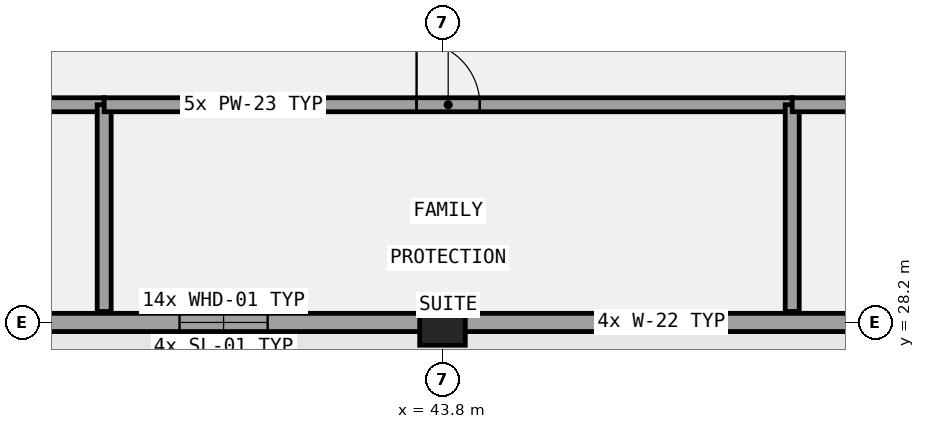
"""IFC4 building model, lengths in metres.
Left out: names, types, materials, properties, quantities, classifications, styles, units other than length and angle.
Written with IfcOpenShell. Run it as: python <this file> out.ifc"""

import sys

from ifc_helpers import new_model, si_unit, direction, frame, frame_2d, origin, origin_2d, place, context, subcontext, project, spatial, rectangle, extrude, element, fill, save


model = new_model("IFC4")
c1 = context("Model", 3, precision=1e-05, world=origin(), true_north=direction((0.0, 1.0)))
c2 = subcontext(c1, "Body", "Model", "MODEL_VIEW")
j1 = project(units=[si_unit("LENGTHUNIT", "METRE"), si_unit("PLANEANGLEUNIT", "RADIAN")], contexts=[c1])
p1 = place(None, origin())
s1 = spatial("IfcSite", under=j1, at=p1, CompositionType="ELEMENT")
p2 = place(p1, origin())
s2 = spatial("IfcBuilding", under=s1, at=p2, CompositionType="ELEMENT")
p3 = place(p2, frame((0.0, 0.0, 5.4)))
s3 = spatial("IfcBuildingStorey", under=s2, at=p3, CompositionType="ELEMENT", Elevation=5.4)
p4 = place(p3, frame((43.8, 28.2, 0.0), z_axis=(0.0, 0.0, 1.0), x_axis=(1.0, 0.0, 0.0)))
e1 = element("IfcColumn", 1, at=p4, inside=s3, PredefinedType="COLUMN", context=c2, shape_type="SweptSolid", body=[
    extrude(rectangle(XDim=0.75, YDim=0.75, at=origin_2d()), origin(), (0.0, 0.0, 1.0), 4.2),
])
p5 = place(p3, frame((29.25, 28.2, 0.0), z_axis=(0.0, 0.0, 1.0), x_axis=(1.0, 0.0, 0.0)))
e2 = element("IfcWall", 2, at=p5, inside=s3, PredefinedType="SOLIDWALL", context=c2, shape_type="SweptSolid", body=[
    extrude(rectangle(XDim=50.3, YDim=0.3, at=frame_2d((25.15, 0.0))), origin(), (0.0, 0.0, 1.0), 2.92),
])
p6 = place(p5, frame((3.025, 0.0, 1.0)))
e3 = element("IfcOpeningElement", 3, at=p6, cuts=e2, PredefinedType="OPENING", context=c2, shape_type="SweptSolid", body=[
    extrude(rectangle(XDim=1.45, YDim=1.65, at=frame_2d((0.725, 0.825))), frame((0.0, 0.16, 0.0), z_axis=(0.0, -1.0, 0.0), x_axis=(1.0, 0.0, 0.0)), (0.0, 0.0, 1.0), 0.32),
])
p7 = place(p5, frame((10.225, 0.0, 1.0)))
e4 = element("IfcOpeningElement", 4, at=p7, cuts=e2, PredefinedType="OPENING", context=c2, shape_type="SweptSolid", body=[
    extrude(rectangle(XDim=1.45, YDim=1.65, at=frame_2d((0.725, 0.825))), frame((0.0, 0.16, 0.0), z_axis=(0.0, -1.0, 0.0), x_axis=(1.0, 0.0, 0.0)), (0.0, 0.0, 1.0), 0.32),
])
p8 = place(p5, frame((17.425, 0.0, 1.0)))
e5 = element("IfcOpeningElement", 5, at=p8, cuts=e2, PredefinedType="OPENING", context=c2, shape_type="SweptSolid", body=[
    extrude(rectangle(XDim=1.45, YDim=1.65, at=frame_2d((0.725, 0.825))), frame((0.0, 0.16, 0.0), z_axis=(0.0, -1.0, 0.0), x_axis=(1.0, 0.0, 0.0)), (0.0, 0.0, 1.0), 0.32),
])
p9 = place(p5, frame((24.625, 0.0, 1.0)))
e6 = element("IfcOpeningElement", 6, at=p9, cuts=e2, PredefinedType="OPENING", context=c2, shape_type="SweptSolid", body=[
    extrude(rectangle(XDim=1.45, YDim=1.65, at=frame_2d((0.725, 0.825))), frame((0.0, 0.16, 0.0), z_axis=(0.0, -1.0, 0.0), x_axis=(1.0, 0.0, 0.0)), (0.0, 0.0, 1.0), 0.32),
])
p10 = place(p5, frame((31.825, 0.0, 1.0)))
e7 = element("IfcOpeningElement", 7, at=p10, cuts=e2, PredefinedType="OPENING", context=c2, shape_type="SweptSolid", body=[
    extrude(rectangle(XDim=1.45, YDim=1.65, at=frame_2d((0.725, 0.825))), frame((0.0, 0.16, 0.0), z_axis=(0.0, -1.0, 0.0), x_axis=(1.0, 0.0, 0.0)), (0.0, 0.0, 1.0), 0.32),
])
p11 = place(p5, frame((39.025, 0.0, 1.0)))
e8 = element("IfcOpeningElement", 8, at=p11, cuts=e2, PredefinedType="OPENING", context=c2, shape_type="SweptSolid", body=[
    extrude(rectangle(XDim=1.45, YDim=1.65, at=frame_2d((0.725, 0.825))), frame((0.0, 0.16, 0.0), z_axis=(0.0, -1.0, 0.0), x_axis=(1.0, 0.0, 0.0)), (0.0, 0.0, 1.0), 0.32),
])
p12 = place(p5, frame((46.1, 0.0, 1.0)))
e9 = element("IfcOpeningElement", 9, at=p12, cuts=e2, PredefinedType="OPENING", context=c2, shape_type="SweptSolid", body=[
    extrude(rectangle(XDim=1.45, YDim=1.65, at=frame_2d((0.725, 0.825))), frame((0.0, 0.16, 0.0), z_axis=(0.0, -1.0, 0.0), x_axis=(1.0, 0.0, 0.0)), (0.0, 0.0, 1.0), 0.32),
])
p13 = place(p3, frame((29.82, 31.78, 0.0), z_axis=(0.0, 0.0, 1.0), x_axis=(1.0, 0.0, 0.0)))
e10 = element("IfcWall", 10, at=p13, inside=s3, PredefinedType="PARTITIONING", context=c2, shape_type="SweptSolid", body=[
    extrude(rectangle(XDim=8.416, YDim=0.23, at=frame_2d((4.208, 0.0))), origin(), (0.0, 0.0, 1.0), 3.37),
])
p14 = place(p13, frame((3.688, 0.0, 0.0)))
e11 = element("IfcOpeningElement", 11, at=p14, cuts=e10, PredefinedType="OPENING", context=c2, shape_type="SweptSolid", body=[
    extrude(rectangle(XDim=1.04, YDim=2.1, at=frame_2d((0.52, 1.05))), frame((0.0, 0.125, 0.0), z_axis=(0.0, -1.0, 0.0), x_axis=(1.0, 0.0, 0.0)), (0.0, 0.0, 1.0), 0.25),
])
p15 = place(p3, frame((38.236, 28.38, 0.0), z_axis=(0.0, 0.0, 1.0), x_axis=(0.0, 1.0, 0.0)))
e12 = element("IfcWall", 12, at=p15, inside=s3, PredefinedType="PARTITIONING", context=c2, shape_type="SweptSolid", body=[
    extrude(rectangle(XDim=3.4, YDim=0.23, at=frame_2d((1.7, 0.0))), origin(), (0.0, 0.0, 1.0), 3.92),
])
p16 = place(p3, frame((38.236, 31.78, 0.0), z_axis=(0.0, 0.0, 1.0), x_axis=(1.0, 0.0, 0.0)))
e13 = element("IfcWall", 13, at=p16, inside=s3, PredefinedType="PARTITIONING", context=c2, shape_type="SweptSolid", body=[
    extrude(rectangle(XDim=11.316, YDim=0.23, at=frame_2d((5.658, 0.0))), origin(), (0.0, 0.0, 1.0), 3.37),
])
p17 = place(p16, frame((5.138, 0.0, 0.0)))
e14 = element("IfcOpeningElement", 14, at=p17, cuts=e13, PredefinedType="OPENING", context=c2, shape_type="SweptSolid", body=[
    extrude(rectangle(XDim=1.04, YDim=2.22, at=frame_2d((0.52, 1.11))), frame((0.0, 0.125, 0.0), z_axis=(0.0, -1.0, 0.0), x_axis=(1.0, 0.0, 0.0)), (0.0, 0.0, 1.0), 0.25),
])
p18 = place(p3, frame((49.552, 28.38, 0.0), z_axis=(0.0, 0.0, 1.0), x_axis=(0.0, 1.0, 0.0)))
e15 = element("IfcWall", 15, at=p18, inside=s3, PredefinedType="PARTITIONING", context=c2, shape_type="SweptSolid", body=[
    extrude(rectangle(XDim=3.4, YDim=0.23, at=frame_2d((1.7, 0.0))), origin(), (0.0, 0.0, 1.0), 3.92),
])
p19 = place(p3, frame((49.552, 31.78, 0.0), z_axis=(0.0, 0.0, 1.0), x_axis=(1.0, 0.0, 0.0)))
e16 = element("IfcWall", 16, at=p19, inside=s3, PredefinedType="PARTITIONING", context=c2, shape_type="SweptSolid", body=[
    extrude(rectangle(XDim=9.866, YDim=0.23, at=frame_2d((4.933, 0.0))), origin(), (0.0, 0.0, 1.0), 3.37),
])
p20 = place(p19, frame((4.413, 0.0, 0.0)))
e17 = element("IfcOpeningElement", 17, at=p20, cuts=e16, PredefinedType="OPENING", context=c2, shape_type="SweptSolid", body=[
    extrude(rectangle(XDim=1.04, YDim=2.35, at=frame_2d((0.52, 1.175))), frame((0.0, 0.125, 0.0), z_axis=(0.0, -1.0, 0.0), x_axis=(1.0, 0.0, 0.0)), (0.0, 0.0, 1.0), 0.25),
])
p21 = place(p7, origin())
e18 = element("IfcWindow", 18, at=p21, inside=s3, PartitioningType="SINGLE_PANEL", PredefinedType="WINDOW", context=c2, shape_type="SweptSolid", body=[
    extrude(rectangle(XDim=1.45, YDim=1.65, at=frame_2d((0.725, 0.825))), frame((0.0, 0.03, 0.0), z_axis=(0.0, -1.0, 0.0), x_axis=(1.0, 0.0, 0.0)), (0.0, 0.0, 1.0), 0.06),
])
fill(e4, e18)
p22 = place(p8, origin())
e19 = element("IfcWindow", 19, at=p22, inside=s3, PartitioningType="SINGLE_PANEL", PredefinedType="WINDOW", context=c2, shape_type="SweptSolid", body=[
    extrude(rectangle(XDim=1.45, YDim=1.65, at=frame_2d((0.725, 0.825))), frame((0.0, 0.03, 0.0), z_axis=(0.0, -1.0, 0.0), x_axis=(1.0, 0.0, 0.0)), (0.0, 0.0, 1.0), 0.06),
])
fill(e5, e19)
p23 = place(p17, frame((1.04, 0.0, 0.0), z_axis=(0.0, 0.0, 1.0), x_axis=(-1.0, 0.0, 0.0)))
e20 = element("IfcDoor", 20, at=p23, inside=s3, OperationType="SINGLE_SWING_LEFT", PredefinedType="DOOR", context=c2, shape_type="SweptSolid", body=[
    extrude(rectangle(XDim=1.04, YDim=2.22, at=frame_2d((0.52, 1.11))), frame((0.0, 0.025, 0.0), z_axis=(0.0, -1.0, 0.0), x_axis=(1.0, 0.0, 0.0)), (0.0, 0.0, 1.0), 0.05),
])
fill(e14, e20)
save(model, sys.argv[1])
